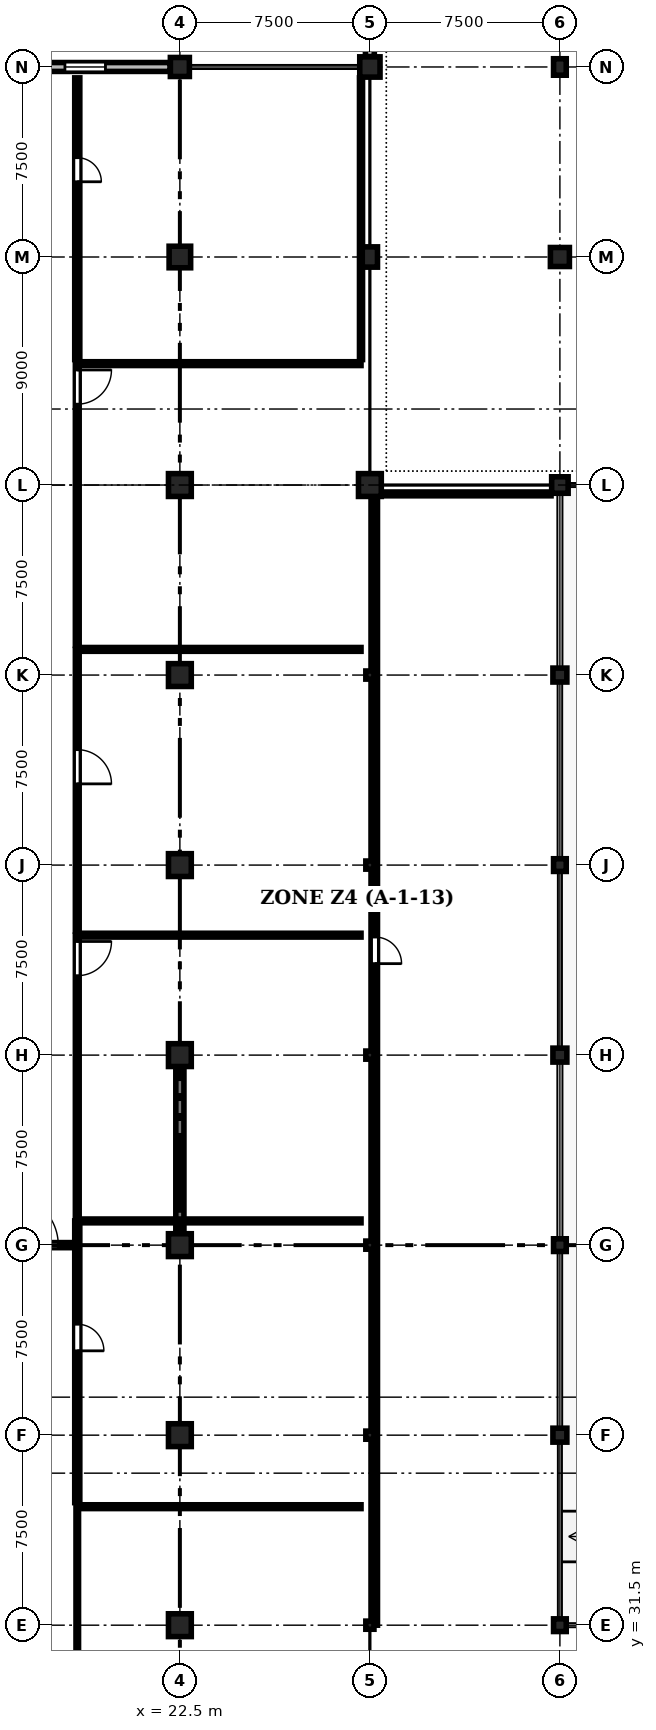
"""IFC4 building model, lengths in metres.
Left out: names, types, materials, properties, quantities, classifications, styles, units other than length and angle.
Written with IfcOpenShell. Run it as: python <this file> out.ifc"""

import sys

from ifc_helpers import new_model, si_unit, direction, frame, frame_2d, origin, origin_2d, place, context, subcontext, project, spatial, rectangle, circle, extrude, element, fill, save


model = new_model("IFC4")
c1 = context("Model", 3, precision=1e-05, world=origin(), true_north=direction((0.0, 1.0)))
c2 = subcontext(c1, "Body", "Model", "MODEL_VIEW")
j1 = project(units=[si_unit("LENGTHUNIT", "METRE"), si_unit("PLANEANGLEUNIT", "RADIAN")], contexts=[c1])
p1 = place(None, origin())
s1 = spatial("IfcSite", under=j1, at=p1, CompositionType="ELEMENT")
p2 = place(p1, origin())
s2 = spatial("IfcBuilding", under=s1, at=p2, CompositionType="ELEMENT")
p3 = place(p2, origin())
s3 = spatial("IfcBuildingStorey", under=s2, at=p3, CompositionType="ELEMENT", Elevation=0.0)
for number, where, z_axis, x_axis in (
    (1, (22.5, 31.5, 0.0), (0.0, 0.0, 1.0), (1.0, 0.0, 0.0)),
    (2, (22.5, 39.0, 0.0), (0.0, 0.0, 1.0), (1.0, 0.0, 0.0)),
):
    element("IfcColumn", number, at=place(p3, frame(where, z_axis=z_axis, x_axis=x_axis)), inside=s3, PredefinedType="COLUMN", context=c2, shape_type="SweptSolid", body=[
        extrude(rectangle(XDim=0.9, YDim=0.9, at=origin_2d()), origin(), (0.0, 0.0, 1.0), 4.8),
    ])
p4 = place(p3, frame((22.5, 46.5, 0.0), z_axis=(0.0, 0.0, 1.0), x_axis=(1.0, 0.0, 0.0)))
e3 = element("IfcColumn", 3, at=p4, inside=s3, PredefinedType="COLUMN", context=c2, shape_type="SweptSolid", body=[
    extrude(circle(Radius=0.45, at=origin_2d()), origin(), (0.0, 0.0, 1.0), 4.8),
])
for number, where, z_axis, x_axis in (
    (4, (22.5, 54.0, 0.0), (0.0, 0.0, 1.0), (1.0, 0.0, 0.0)),
    (5, (22.5, 61.5, 0.0), (0.0, 0.0, 1.0), (1.0, 0.0, 0.0)),
):
    element("IfcColumn", number, at=place(p3, frame(where, z_axis=z_axis, x_axis=x_axis)), inside=s3, PredefinedType="COLUMN", context=c2, shape_type="SweptSolid", body=[
        extrude(rectangle(XDim=0.9, YDim=0.9, at=origin_2d()), origin(), (0.0, 0.0, 1.0), 4.8),
    ])
p5 = place(p3, frame((22.5, 69.0, 0.0), z_axis=(0.0, 0.0, 1.0), x_axis=(1.0, 0.0, 0.0)))
e6 = element("IfcColumn", 6, at=p5, inside=s3, PredefinedType="COLUMN", context=c2, shape_type="SweptSolid", body=[
    extrude(circle(Radius=0.45, at=origin_2d()), origin(), (0.0, 0.0, 1.0), 4.8),
])
p6 = place(p3, frame((22.5, 76.5, 0.0), z_axis=(0.0, 0.0, 1.0), x_axis=(1.0, 0.0, 0.0)))
e7 = element("IfcColumn", 7, at=p6, inside=s3, PredefinedType="COLUMN", context=c2, shape_type="SweptSolid", body=[
    extrude(rectangle(XDim=0.9, YDim=0.9, at=origin_2d()), origin(), (0.0, 0.0, 1.0), 4.8),
])
p7 = place(p3, frame((22.5, 85.5, 0.0), z_axis=(0.0, 0.0, 1.0), x_axis=(1.0, 0.0, 0.0)))
e8 = element("IfcColumn", 8, at=p7, inside=s3, PredefinedType="COLUMN", context=c2, shape_type="SweptSolid", body=[
    extrude(rectangle(XDim=0.85, YDim=0.85, at=origin_2d()), origin(), (0.0, 0.0, 1.0), 4.8),
])
p8 = place(p3, frame((22.5, 93.0, 0.0), z_axis=(0.0, 0.0, 1.0), x_axis=(1.0, 0.0, 0.0)))
e9 = element("IfcColumn", 9, at=p8, inside=s3, PredefinedType="COLUMN", context=c2, shape_type="SweptSolid", body=[
    extrude(circle(Radius=0.375, at=origin_2d()), origin(), (0.0, 0.0, 1.0), 4.8),
])
for number, where, z_axis, x_axis in (
    (10, (30.0, 31.5, 0.0), (0.0, 0.0, 1.0), (1.0, 0.0, 0.0)),
    (11, (30.0, 39.0, 0.0), (0.0, 0.0, 1.0), (1.0, 0.0, 0.0)),
    (12, (30.0, 46.5, 0.0), (0.0, 0.0, 1.0), (1.0, 0.0, 0.0)),
    (13, (30.0, 54.0, 0.0), (0.0, 0.0, 1.0), (1.0, 0.0, 0.0)),
    (14, (30.0, 61.5, 0.0), (0.0, 0.0, 1.0), (1.0, 0.0, 0.0)),
    (15, (30.0, 69.0, 0.0), (0.0, 0.0, 1.0), (1.0, 0.0, 0.0)),
):
    element("IfcColumn", number, at=place(p3, frame(where, z_axis=z_axis, x_axis=x_axis)), inside=s3, PredefinedType="COLUMN", context=c2, shape_type="SweptSolid", body=[
        extrude(rectangle(XDim=0.32, YDim=0.32, at=origin_2d()), origin(), (0.0, 0.0, 1.0), 4.8),
    ])
p9 = place(p3, frame((30.0, 76.5, 0.0), z_axis=(0.0, 0.0, 1.0), x_axis=(1.0, 0.0, 0.0)))
e16 = element("IfcColumn", 16, at=p9, inside=s3, PredefinedType="COLUMN", context=c2, shape_type="SweptSolid", body=[
    extrude(rectangle(XDim=0.9, YDim=0.9, at=origin_2d()), origin(), (0.0, 0.0, 1.0), 4.8),
])
p10 = place(p3, frame((30.0, 85.5, 0.0), z_axis=(0.0, 0.0, 1.0), x_axis=(1.0, 0.0, 0.0)))
e17 = element("IfcColumn", 17, at=p10, inside=s3, PredefinedType="COLUMN", context=c2, shape_type="SweptSolid", body=[
    extrude(rectangle(XDim=0.6, YDim=0.8, at=origin_2d()), origin(), (0.0, 0.0, 1.0), 4.8),
])
p11 = place(p3, frame((30.0, 93.0, 0.0), z_axis=(0.0, 0.0, 1.0), x_axis=(1.0, 0.0, 0.0)))
e18 = element("IfcColumn", 18, at=p11, inside=s3, PredefinedType="COLUMN", context=c2, shape_type="SweptSolid", body=[
    extrude(rectangle(XDim=0.8, YDim=0.8, at=origin_2d()), origin(), (0.0, 0.0, 1.0), 4.8),
])
p12 = place(p3, frame((37.5, 31.5, 0.0), z_axis=(0.0, 0.0, 1.0), x_axis=(1.0, 0.0, 0.0)))
e19 = element("IfcColumn", 19, at=p12, inside=s3, PredefinedType="COLUMN", context=c2, shape_type="SweptSolid", body=[
    extrude(rectangle(XDim=0.5, YDim=0.5, at=origin_2d()), origin(), (0.0, 0.0, 1.0), 4.8),
])
p13 = place(p3, frame((37.5, 39.0, 0.0), z_axis=(0.0, 0.0, 1.0), x_axis=(1.0, 0.0, 0.0)))
e20 = element("IfcColumn", 20, at=p13, inside=s3, PredefinedType="COLUMN", context=c2, shape_type="SweptSolid", body=[
    extrude(rectangle(XDim=0.55, YDim=0.55, at=origin_2d()), origin(), (0.0, 0.0, 1.0), 4.8),
])
p14 = place(p3, frame((37.5, 46.5, 0.0), z_axis=(0.0, 0.0, 1.0), x_axis=(1.0, 0.0, 0.0)))
e21 = element("IfcColumn", 21, at=p14, inside=s3, PredefinedType="COLUMN", context=c2, shape_type="SweptSolid", body=[
    extrude(rectangle(XDim=0.5, YDim=0.5, at=origin_2d()), origin(), (0.0, 0.0, 1.0), 4.8),
])
p15 = place(p3, frame((37.5, 54.0, 0.0), z_axis=(0.0, 0.0, 1.0), x_axis=(1.0, 0.0, 0.0)))
e22 = element("IfcColumn", 22, at=p15, inside=s3, PredefinedType="COLUMN", context=c2, shape_type="SweptSolid", body=[
    extrude(rectangle(XDim=0.55, YDim=0.55, at=origin_2d()), origin(), (0.0, 0.0, 1.0), 4.8),
])
p16 = place(p3, frame((37.5, 61.5, 0.0), z_axis=(0.0, 0.0, 1.0), x_axis=(1.0, 0.0, 0.0)))
e23 = element("IfcColumn", 23, at=p16, inside=s3, PredefinedType="COLUMN", context=c2, shape_type="SweptSolid", body=[
    extrude(rectangle(XDim=0.5, YDim=0.5, at=origin_2d()), origin(), (0.0, 0.0, 1.0), 4.8),
])
p17 = place(p3, frame((37.5, 69.0, 0.0), z_axis=(0.0, 0.0, 1.0), x_axis=(1.0, 0.0, 0.0)))
e24 = element("IfcColumn", 24, at=p17, inside=s3, PredefinedType="COLUMN", context=c2, shape_type="SweptSolid", body=[
    extrude(rectangle(XDim=0.55, YDim=0.55, at=origin_2d()), origin(), (0.0, 0.0, 1.0), 4.8),
])
p18 = place(p3, frame((37.5, 76.5, 0.0), z_axis=(0.0, 0.0, 1.0), x_axis=(1.0, 0.0, 0.0)))
e25 = element("IfcColumn", 25, at=p18, inside=s3, PredefinedType="COLUMN", context=c2, shape_type="SweptSolid", body=[
    extrude(rectangle(XDim=0.65, YDim=0.65, at=origin_2d()), origin(), (0.0, 0.0, 1.0), 4.8),
])
p19 = place(p3, frame((37.5, 85.5, 0.0), z_axis=(0.0, 0.0, 1.0), x_axis=(1.0, 0.0, 0.0)))
e26 = element("IfcColumn", 26, at=p19, inside=s3, PredefinedType="COLUMN", context=c2, shape_type="SweptSolid", body=[
    extrude(rectangle(XDim=0.75, YDim=0.75, at=origin_2d()), origin(), (0.0, 0.0, 1.0), 4.8),
])
p20 = place(p3, frame((37.5, 93.0, 0.0), z_axis=(0.0, 0.0, 1.0), x_axis=(1.0, 0.0, 0.0)))
e27 = element("IfcColumn", 27, at=p20, inside=s3, PredefinedType="COLUMN", context=c2, shape_type="SweptSolid", body=[
    extrude(rectangle(XDim=0.5, YDim=0.65, at=origin_2d()), origin(), (0.0, 0.0, 1.0), 4.8),
])
p21 = place(p3, frame((22.5, 46.95, 0.0), z_axis=(0.0, 0.0, 1.0), x_axis=(0.0, 1.0, 0.0)))
e28 = element("IfcWall", 28, at=p21, inside=s3, PredefinedType="SHEAR", context=c2, shape_type="SweptSolid", body=[
    extrude(rectangle(XDim=6.6, YDim=0.32, at=frame_2d((3.3, 0.0))), origin(), (0.0, 0.0, 1.0), 3.95),
])
p22 = place(p3, frame((15.41, 93.0, 0.0), z_axis=(0.0, 0.0, 1.0), x_axis=(1.0, 0.0, 0.0)))
e29 = element("IfcWall", 29, at=p22, inside=s3, PredefinedType="STANDARD", context=c2, shape_type="SweptSolid", body=[
    extrude(rectangle(XDim=6.705, YDim=0.35, at=frame_2d((3.353, 0.0))), origin(), (0.0, 0.0, 1.0), 3.95),
])
p23 = place(p22, frame((2.552, 0.0, 0.9)))
e30 = element("IfcOpeningElement", 30, at=p23, cuts=e29, PredefinedType="OPENING", context=c2, shape_type="SweptSolid", body=[
    extrude(rectangle(XDim=1.6, YDim=1.8, at=frame_2d((0.8, 0.9))), frame((0.0, 0.185, 0.0), z_axis=(0.0, -1.0, 0.0), x_axis=(1.0, 0.0, 0.0)), (0.0, 0.0, 1.0), 0.37),
])
p24 = place(p3, frame((30.0, 93.41, 0.0), z_axis=(0.0, 0.0, 1.0), x_axis=(0.0, 1.0, 0.0)))
e31 = element("IfcWall", 31, at=p24, inside=s3, PredefinedType="STANDARD", context=c2, shape_type="SweptSolid", body=[
    extrude(rectangle(XDim=6.755, YDim=0.35, at=frame_2d((3.377, 0.0))), origin(), (0.0, 0.0, 1.0), 3.9),
])
p25 = place(p24, frame((2.478, 0.0, 0.9)))
e32 = element("IfcOpeningElement", 32, at=p25, cuts=e31, PredefinedType="OPENING", context=c2, shape_type="SweptSolid", body=[
    extrude(rectangle(XDim=1.8, YDim=2.4, at=frame_2d((0.9, 1.2))), frame((0.0, 0.185, 0.0), z_axis=(0.0, -1.0, 0.0), x_axis=(1.0, 0.0, 0.0)), (0.0, 0.0, 1.0), 0.37),
])
p26 = place(p3, frame((18.45, 36.177, 0.0), z_axis=(0.0, 0.0, 1.0), x_axis=(0.0, -1.0, 0.0)))
e33 = element("IfcWall", 33, at=p26, inside=s3, PredefinedType="PARTITIONING", context=c2, shape_type="SweptSolid", body=[
    extrude(rectangle(XDim=11.118, YDim=0.1, at=frame_2d((5.559, 0.0))), origin(), (0.0, 0.0, 1.0), 4.085),
])
p27 = place(p26, frame((8.771, 0.0, 0.0)))
e34 = element("IfcOpeningElement", 34, at=p27, cuts=e33, PredefinedType="OPENING", context=c2, shape_type="SweptSolid", body=[
    extrude(rectangle(XDim=1.15, YDim=2.2, at=frame_2d((0.575, 1.1))), frame((0.0, 0.06, 0.0), z_axis=(0.0, -1.0, 0.0), x_axis=(1.0, 0.0, 0.0)), (0.0, 0.0, 1.0), 0.12),
])
p28 = place(p3, frame((18.45, 47.456, 0.0), z_axis=(0.0, 0.0, 1.0), x_axis=(0.0, -1.0, 0.0)))
e35 = element("IfcWall", 35, at=p28, inside=s3, PredefinedType="STANDARD", context=c2, shape_type="SweptSolid", body=[
    extrude(rectangle(XDim=11.119, YDim=0.2, at=frame_2d((5.559, 0.0))), origin(), (0.0, 0.0, 1.0), 4.485),
])
p29 = place(p28, frame((4.077, 0.0, 0.0)))
e36 = element("IfcOpeningElement", 36, at=p29, cuts=e35, PredefinedType="OPENING", context=c2, shape_type="SweptSolid", body=[
    extrude(rectangle(XDim=1.05, YDim=2.2, at=frame_2d((0.525, 1.1))), frame((0.0, 0.11, 0.0), z_axis=(0.0, -1.0, 0.0), x_axis=(1.0, 0.0, 0.0)), (0.0, 0.0, 1.0), 0.22),
])
p30 = place(p3, frame((18.45, 58.734, 0.0), z_axis=(0.0, 0.0, 1.0), x_axis=(0.0, -1.0, 0.0)))
e37 = element("IfcWall", 37, at=p30, inside=s3, PredefinedType="PARTITIONING", context=c2, shape_type="SweptSolid", body=[
    extrude(rectangle(XDim=11.119, YDim=0.15, at=frame_2d((5.559, 0.0))), origin(), (0.0, 0.0, 1.0), 4.485),
])
p31 = place(p30, frame((0.25, 0.0, 0.0)))
e38 = element("IfcOpeningElement", 38, at=p31, cuts=e37, PredefinedType="OPENING", context=c2, shape_type="SweptSolid", body=[
    extrude(rectangle(XDim=1.35, YDim=2.25, at=frame_2d((0.675, 1.125))), frame((0.0, 0.085, 0.0), z_axis=(0.0, -1.0, 0.0), x_axis=(1.0, 0.0, 0.0)), (0.0, 0.0, 1.0), 0.17),
])
p32 = place(p3, frame((18.45, 70.013, 0.0), z_axis=(0.0, 0.0, 1.0), x_axis=(0.0, -1.0, 0.0)))
e39 = element("IfcWall", 39, at=p32, inside=s3, PredefinedType="PARTITIONING", context=c2, shape_type="SweptSolid", body=[
    extrude(rectangle(XDim=11.119, YDim=0.15, at=frame_2d((5.559, 0.0))), origin(), (0.0, 0.0, 1.0), 4.485),
])
p33 = place(p32, frame((3.958, 0.0, 0.0)))
e40 = element("IfcOpeningElement", 40, at=p33, cuts=e39, PredefinedType="OPENING", context=c2, shape_type="SweptSolid", body=[
    extrude(rectangle(XDim=1.35, YDim=2.25, at=frame_2d((0.675, 1.125))), frame((0.0, 0.085, 0.0), z_axis=(0.0, -1.0, 0.0), x_axis=(1.0, 0.0, 0.0)), (0.0, 0.0, 1.0), 0.17),
])
p34 = place(p3, frame((18.45, 81.292, 0.0), z_axis=(0.0, 0.0, 1.0), x_axis=(0.0, -1.0, 0.0)))
e41 = element("IfcWall", 41, at=p34, inside=s3, PredefinedType="PARTITIONING", context=c2, shape_type="SweptSolid", body=[
    extrude(rectangle(XDim=11.119, YDim=0.15, at=frame_2d((5.559, 0.0))), origin(), (0.0, 0.0, 1.0), 4.085),
])
p35 = place(p34, frame((0.25, 0.0, 0.0)))
e42 = element("IfcOpeningElement", 42, at=p35, cuts=e41, PredefinedType="OPENING", context=c2, shape_type="SweptSolid", body=[
    extrude(rectangle(XDim=1.35, YDim=2.25, at=frame_2d((0.675, 1.125))), frame((0.0, 0.085, 0.0), z_axis=(0.0, -1.0, 0.0), x_axis=(1.0, 0.0, 0.0)), (0.0, 0.0, 1.0), 0.17),
])
p36 = place(p3, frame((18.45, 92.57, 0.0), z_axis=(0.0, 0.0, 1.0), x_axis=(0.0, -1.0, 0.0)))
e43 = element("IfcWall", 43, at=p36, inside=s3, PredefinedType="STANDARD", context=c2, shape_type="SweptSolid", body=[
    extrude(rectangle(XDim=11.119, YDim=0.2, at=frame_2d((5.559, 0.0))), origin(), (0.0, 0.0, 1.0), 4.085),
])
p37 = place(p36, frame((3.151, 0.0, 0.0)))
e44 = element("IfcOpeningElement", 44, at=p37, cuts=e43, PredefinedType="OPENING", context=c2, shape_type="SweptSolid", body=[
    extrude(rectangle(XDim=0.95, YDim=2.15, at=frame_2d((0.475, 1.075))), frame((0.0, 0.11, 0.0), z_axis=(0.0, -1.0, 0.0), x_axis=(1.0, 0.0, 0.0)), (0.0, 0.0, 1.0), 0.22),
])
p38 = place(p3, frame((30.2, 76.15, 0.0), z_axis=(0.0, 0.0, 1.0), x_axis=(0.0, -1.0, 0.0)))
e45 = element("IfcWall", 45, at=p38, inside=s3, PredefinedType="STANDARD", context=c2, shape_type="SweptSolid", body=[
    extrude(rectangle(XDim=44.65, YDim=0.2, at=frame_2d((22.325, 0.0))), origin(), (0.0, 0.0, 1.0), 3.935),
])
p39 = place(p38, frame((17.49, 0.0, 0.0)))
e46 = element("IfcOpeningElement", 46, at=p39, cuts=e45, PredefinedType="OPENING", context=c2, shape_type="SweptSolid", body=[
    extrude(rectangle(XDim=1.05, YDim=2.2, at=frame_2d((0.525, 1.1))), frame((0.0, 0.11, 0.0), z_axis=(0.0, -1.0, 0.0), x_axis=(1.0, 0.0, 0.0)), (0.0, 0.0, 1.0), 0.22),
])
for number, where, z_axis, x_axis in (
    (47, (18.45, 36.177, 0.0), (0.0, 0.0, 1.0), (1.0, 0.0, 0.0)),
    (48, (18.45, 47.456, 0.0), (0.0, 0.0, 1.0), (1.0, 0.0, 0.0)),
    (49, (18.45, 58.734, 0.0), (0.0, 0.0, 1.0), (1.0, 0.0, 0.0)),
    (50, (18.45, 70.013, 0.0), (0.0, 0.0, 1.0), (1.0, 0.0, 0.0)),
    (51, (18.45, 81.292, 0.0), (0.0, 0.0, 1.0), (1.0, 0.0, 0.0)),
):
    element("IfcWall", number, at=place(p3, frame(where, z_axis=z_axis, x_axis=x_axis)), inside=s3, PredefinedType="PARTITIONING", context=c2, shape_type="SweptSolid", body=[
        extrude(rectangle(XDim=11.2, YDim=0.15, at=frame_2d((5.6, 0.0))), origin(), (0.0, 0.0, 1.0), 4.485),
    ])
p40 = place(p3, frame((30.2, 76.15, 0.0), z_axis=(0.0, 0.0, 1.0), x_axis=(1.0, 0.0, 0.0)))
e52 = element("IfcWall", 52, at=p40, inside=s3, PredefinedType="PARTITIONING", context=c2, shape_type="SweptSolid", body=[
    extrude(rectangle(XDim=6.95, YDim=0.15, at=frame_2d((3.475, 0.0))), origin(), (0.0, 0.0, 1.0), 3.835),
])
p41 = place(p3, frame((29.65, 81.451, 0.0), z_axis=(0.0, 0.0, 1.0), x_axis=(0.0, 1.0, 0.0)))
e53 = element("IfcWall", 53, at=p41, inside=s3, PredefinedType="PARTITIONING", context=c2, shape_type="SweptSolid", body=[
    extrude(rectangle(XDim=11.119, YDim=0.12, at=frame_2d((5.559, 0.0))), origin(), (0.0, 0.0, 1.0), 3.785),
])
p42 = place(p3, frame((15.2, 46.5, 0.0), z_axis=(0.0, 0.0, 1.0), x_axis=(1.0, 0.0, 0.0)))
e54 = element("IfcWall", 54, at=p42, inside=s3, PredefinedType="STANDARD", context=c2, shape_type="SweptSolid", body=[
    extrude(rectangle(XDim=3.0, YDim=0.2, at=frame_2d((1.5, 0.0))), origin(), (0.0, 0.0, 1.0), 3.835),
])
p43 = place(p42, frame((0.5, 0.0, 0.0)))
e55 = element("IfcOpeningElement", 55, at=p43, cuts=e54, PredefinedType="OPENING", context=c2, shape_type="SweptSolid", body=[
    extrude(rectangle(XDim=2.0, YDim=2.3, at=frame_2d((1.0, 1.15))), frame((0.0, 0.11, 0.0), z_axis=(0.0, -1.0, 0.0), x_axis=(1.0, 0.0, 0.0)), (0.0, 0.0, 1.0), 0.22),
])
p44 = place(p23, origin())
e56 = element("IfcWindow", 56, at=p44, inside=s3, PartitioningType="SINGLE_PANEL", PredefinedType="WINDOW", context=c2, shape_type="SweptSolid", body=[
    extrude(rectangle(XDim=1.6, YDim=1.8, at=frame_2d((0.8, 0.9))), frame((0.0, 0.03, 0.0), z_axis=(0.0, -1.0, 0.0), x_axis=(1.0, 0.0, 0.0)), (0.0, 0.0, 1.0), 0.06),
])
fill(e30, e56)
p45 = place(p29, origin())
e57 = element("IfcDoor", 57, at=p45, inside=s3, OperationType="SINGLE_SWING_RIGHT", PredefinedType="DOOR", context=c2, shape_type="SweptSolid", body=[
    extrude(rectangle(XDim=1.05, YDim=2.2, at=frame_2d((0.525, 1.1))), frame((0.0, 0.025, 0.0), z_axis=(0.0, -1.0, 0.0), x_axis=(1.0, 0.0, 0.0)), (0.0, 0.0, 1.0), 0.05),
])
fill(e36, e57)
p46 = place(p31, origin())
e58 = element("IfcDoor", 58, at=p46, inside=s3, OperationType="SINGLE_SWING_LEFT", PredefinedType="DOOR", context=c2, shape_type="SweptSolid", body=[
    extrude(rectangle(XDim=1.35, YDim=2.25, at=frame_2d((0.675, 1.125))), frame((0.0, 0.025, 0.0), z_axis=(0.0, -1.0, 0.0), x_axis=(1.0, 0.0, 0.0)), (0.0, 0.0, 1.0), 0.05),
])
fill(e38, e58)
p47 = place(p33, origin())
e59 = element("IfcDoor", 59, at=p47, inside=s3, OperationType="SINGLE_SWING_RIGHT", PredefinedType="DOOR", context=c2, shape_type="SweptSolid", body=[
    extrude(rectangle(XDim=1.35, YDim=2.25, at=frame_2d((0.675, 1.125))), frame((0.0, 0.025, 0.0), z_axis=(0.0, -1.0, 0.0), x_axis=(1.0, 0.0, 0.0)), (0.0, 0.0, 1.0), 0.05),
])
fill(e40, e59)
p48 = place(p35, origin())
e60 = element("IfcDoor", 60, at=p48, inside=s3, OperationType="SINGLE_SWING_LEFT", PredefinedType="DOOR", context=c2, shape_type="SweptSolid", body=[
    extrude(rectangle(XDim=1.35, YDim=2.25, at=frame_2d((0.675, 1.125))), frame((0.0, 0.025, 0.0), z_axis=(0.0, -1.0, 0.0), x_axis=(1.0, 0.0, 0.0)), (0.0, 0.0, 1.0), 0.05),
])
fill(e42, e60)
p49 = place(p37, origin())
e61 = element("IfcDoor", 61, at=p49, inside=s3, OperationType="SINGLE_SWING_RIGHT", PredefinedType="DOOR", context=c2, shape_type="SweptSolid", body=[
    extrude(rectangle(XDim=0.95, YDim=2.15, at=frame_2d((0.475, 1.075))), frame((0.0, 0.025, 0.0), z_axis=(0.0, -1.0, 0.0), x_axis=(1.0, 0.0, 0.0)), (0.0, 0.0, 1.0), 0.05),
])
fill(e44, e61)
p50 = place(p39, origin())
e62 = element("IfcDoor", 62, at=p50, inside=s3, OperationType="SINGLE_SWING_RIGHT", PredefinedType="DOOR", context=c2, shape_type="SweptSolid", body=[
    extrude(rectangle(XDim=1.05, YDim=2.2, at=frame_2d((0.525, 1.1))), frame((0.0, 0.025, 0.0), z_axis=(0.0, -1.0, 0.0), x_axis=(1.0, 0.0, 0.0)), (0.0, 0.0, 1.0), 0.05),
])
fill(e46, e62)
p51 = place(p43, origin())
e63 = element("IfcDoor", 63, at=p51, inside=s3, OperationType="DOUBLE_DOOR_SINGLE_SWING", PredefinedType="DOOR", context=c2, shape_type="SweptSolid", body=[
    extrude(rectangle(XDim=2.0, YDim=2.3, at=frame_2d((1.0, 1.15))), frame((0.0, 0.025, 0.0), z_axis=(0.0, -1.0, 0.0), x_axis=(1.0, 0.0, 0.0)), (0.0, 0.0, 1.0), 0.05),
])
fill(e55, e63)
save(model, sys.argv[1])
